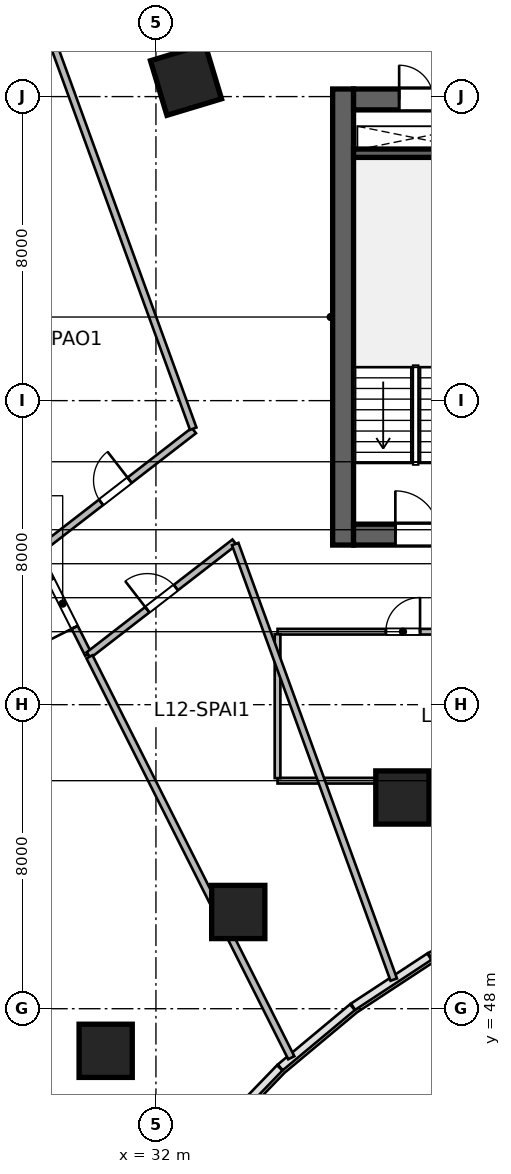
"""IFC4 building model, lengths in metres.
Left out: names, types, materials, properties, quantities, classifications, styles, units other than length and angle.
Written with IfcOpenShell. Run it as: python <this file> out.ifc"""

import sys

from ifc_helpers import new_model, si_unit, direction, frame, frame_2d, origin, origin_2d, place, context, subcontext, project, spatial, rectangle, circle, extrude, source, transform, mapped, element, fill, save


model = new_model("IFC4")
c1 = context("Model", 3, precision=1e-05, world=origin(), true_north=direction((0.0, 1.0)))
c2 = subcontext(c1, "Body", "Model", "MODEL_VIEW")
j1 = project(units=[si_unit("LENGTHUNIT", "METRE"), si_unit("PLANEANGLEUNIT", "RADIAN")], contexts=[c1])
p1 = place(None, origin())
s1 = spatial("IfcSite", under=j1, at=p1, CompositionType="ELEMENT")
p2 = place(p1, origin())
s2 = spatial("IfcBuilding", under=s1, at=p2, CompositionType="ELEMENT")
p3 = place(p2, frame((0.0, 0.0, 57.0)))
s3 = spatial("IfcBuildingStorey", under=s2, at=p3, CompositionType="ELEMENT", Elevation=57.0)
m1 = source(origin(), c2, "Body", "SweptSolid", [
    extrude(rectangle(XDim=12.0, YDim=0.55, at=frame_2d((6.0, 0.0))), origin(), (0.0, 0.0, 1.0), 3.6),
])
p4 = place(p3, frame((36.925, 60.2, 0.0), z_axis=(0.0, 0.0, 1.0), x_axis=(0.0, 1.0, 0.0)))
e1 = element("IfcWall", 1, at=p4, inside=s3, PredefinedType="SHEAR", context=c2, shape_type="MappedRepresentation", body=[
    mapped(m1, transform((0.0, 0.0, 0.0), scale=1.0)),
])
m2 = source(origin(), c2, "Body", "SweptSolid", [
    extrude(rectangle(XDim=21.6, YDim=0.55, at=frame_2d((10.8, 0.0))), origin(), (0.0, 0.0, 1.0), 3.6),
])
p5 = place(p3, frame((37.2, 60.475, 0.0), z_axis=(0.0, 0.0, 1.0), x_axis=(1.0, 0.0, 0.0)))
e2 = element("IfcWall", 2, at=p5, inside=s3, PredefinedType="SHEAR", context=c2, shape_type="MappedRepresentation", body=[
    mapped(m2, transform((0.0, 0.0, 0.0), scale=1.0)),
])
p6 = place(p5, frame((1.1, 0.0, 0.0)))
e3 = element("IfcOpeningElement", 3, at=p6, cuts=e2, PredefinedType="OPENING", context=c2, shape_type="SweptSolid", body=[
    extrude(rectangle(XDim=1.15, YDim=2.15, at=frame_2d((0.575, 1.075))), frame((0.0, 0.285, 0.0), z_axis=(0.0, -1.0, 0.0), x_axis=(1.0, 0.0, 0.0)), (0.0, 0.0, 1.0), 0.57),
])
p7 = place(p5, frame((19.5, 0.0, 0.0)))
e4 = element("IfcOpeningElement", 4, at=p7, cuts=e2, PredefinedType="OPENING", context=c2, shape_type="SweptSolid", body=[
    extrude(rectangle(XDim=0.9, YDim=2.1, at=frame_2d((0.45, 1.05))), frame((0.0, 0.285, 0.0), z_axis=(0.0, -1.0, 0.0), x_axis=(1.0, 0.0, 0.0)), (0.0, 0.0, 1.0), 0.57),
])
p8 = place(p5, frame((12.02, 0.0, 0.0)))
e5 = element("IfcOpeningElement", 5, at=p8, cuts=e2, PredefinedType="OPENING", context=c2, shape_type="SweptSolid", body=[
    extrude(rectangle(XDim=1.6, YDim=2.15, at=frame_2d((0.8, 1.075))), frame((0.0, 0.285, 0.0), z_axis=(0.0, -1.0, 0.0), x_axis=(1.0, 0.0, 0.0)), (0.0, 0.0, 1.0), 0.57),
])
p9 = place(p3, frame((37.2, 71.925, 0.0), z_axis=(0.0, 0.0, 1.0), x_axis=(1.0, 0.0, 0.0)))
e6 = element("IfcWall", 6, at=p9, inside=s3, PredefinedType="SHEAR", context=c2, shape_type="MappedRepresentation", body=[
    mapped(m2, transform((0.0, 0.0, 0.0), scale=1.0)),
])
p10 = place(p9, frame((1.2, 0.0, 0.0)))
e7 = element("IfcOpeningElement", 7, at=p10, cuts=e6, PredefinedType="OPENING", context=c2, shape_type="SweptSolid", body=[
    extrude(rectangle(XDim=0.9, YDim=2.1, at=frame_2d((0.45, 1.05))), frame((0.0, 0.285, 0.0), z_axis=(0.0, -1.0, 0.0), x_axis=(1.0, 0.0, 0.0)), (0.0, 0.0, 1.0), 0.57),
])
p11 = place(p9, frame((14.7, 0.0, 0.0)))
e8 = element("IfcOpeningElement", 8, at=p11, cuts=e6, PredefinedType="OPENING", context=c2, shape_type="SweptSolid", body=[
    extrude(rectangle(XDim=1.2, YDim=2.15, at=frame_2d((0.6, 1.075))), frame((0.0, 0.285, 0.0), z_axis=(0.0, -1.0, 0.0), x_axis=(1.0, 0.0, 0.0)), (0.0, 0.0, 1.0), 0.57),
])
p12 = place(p9, frame((4.15, 0.0, 0.0)))
e9 = element("IfcOpeningElement", 9, at=p12, cuts=e6, PredefinedType="OPENING", context=c2, shape_type="SweptSolid", body=[
    extrude(rectangle(XDim=1.3, YDim=2.15, at=frame_2d((0.65, 1.075))), frame((0.0, 0.285, 0.0), z_axis=(0.0, -1.0, 0.0), x_axis=(1.0, 0.0, 0.0)), (0.0, 0.0, 1.0), 0.57),
])
p13 = place(p9, frame((7.25, 0.0, 0.0)))
e10 = element("IfcOpeningElement", 10, at=p13, cuts=e6, PredefinedType="OPENING", context=c2, shape_type="SweptSolid", body=[
    extrude(rectangle(XDim=0.9, YDim=2.1, at=frame_2d((0.45, 1.05))), frame((0.0, 0.285, 0.0), z_axis=(0.0, -1.0, 0.0), x_axis=(1.0, 0.0, 0.0)), (0.0, 0.0, 1.0), 0.57),
])
m3 = source(origin(), c2, "Body", "SweptSolid", [
    extrude(rectangle(XDim=3.27, YDim=0.22, at=frame_2d((1.635, 0.0))), origin(), (0.0, 0.0, 1.0), 3.6),
])
p14 = place(p3, frame((37.2, 70.51, 0.0), z_axis=(0.0, 0.0, 1.0), x_axis=(1.0, 0.0, 0.0)))
e11 = element("IfcWall", 11, at=p14, inside=s3, PredefinedType="SHEAR", context=c2, shape_type="MappedRepresentation", body=[
    mapped(m3, transform((0.0, 0.0, 0.0), scale=1.0)),
])
m4 = source(origin(), c2, "Body", "SweptSolid", [
    extrude(circle(Radius=0.7, at=origin_2d()), origin(), (0.0, 0.0, 1.0), 3.6),
])
for number, where, z_axis, x_axis in (
    (12, (30.677, 46.892, 0.0), (0.0, 0.0, 1.0), (-0.571, 0.821, 0.0)),
    (13, (34.166, 50.545, 0.0), (0.0, 0.0, 1.0), (-0.436, 0.9, 0.0)),
    (14, (38.485, 53.558, 0.0), (0.0, 0.0, 1.0), (-0.289, 0.957, 0.0)),
):
    element("IfcColumn", number, at=place(p3, frame(where, z_axis=z_axis, x_axis=x_axis)), inside=s3, PredefinedType="COLUMN", context=c2, shape_type="MappedRepresentation", body=[
        mapped(m4, transform((0.0, 0.0, 0.0), scale=1.0)),
    ])
m5 = source(origin(), c2, "Body", "SweptSolid", [
    extrude(rectangle(XDim=1.5, YDim=1.5, at=origin_2d()), origin(), (0.0, 0.0, 1.0), 3.6),
])
p15 = place(p3, frame((32.791, 72.442, 0.0), z_axis=(0.0, 0.0, 1.0), x_axis=(-0.288697611798, 0.957420330337, 0.0)))
e15 = element("IfcColumn", 15, at=p15, inside=s3, PredefinedType="COLUMN", context=c2, shape_type="MappedRepresentation", body=[
    mapped(m5, transform((0.0, 0.0, 0.0), scale=1.0)),
])
m6 = source(origin(), c2, "Body", "SweptSolid", [
    extrude(rectangle(XDim=6.6, YDim=0.15, at=frame_2d((3.3, 0.0))), origin(), (0.0, 0.0, 1.0), 2.803),
])
p16 = place(p3, frame((35.2, 54.0, 0.0), z_axis=(0.0, 0.0, 1.0), x_axis=(1.0, 0.0, 0.0)))
e16 = element("IfcWall", 16, at=p16, inside=s3, PredefinedType="PARTITIONING", context=c2, shape_type="MappedRepresentation", body=[
    mapped(m6, transform((0.0, 0.0, 0.0), scale=1.0)),
])
m7 = source(origin(), c2, "Body", "SweptSolid", [
    extrude(rectangle(XDim=6.6, YDim=0.15, at=frame_2d((3.3, 0.0))), origin(), (0.0, 0.0, 1.0), 3.36),
])
p17 = place(p3, frame((35.2, 57.92, 0.0), z_axis=(0.0, 0.0, 1.0), x_axis=(1.0, 0.0, 0.0)))
e17 = element("IfcWall", 17, at=p17, inside=s3, PredefinedType="PARTITIONING", context=c2, shape_type="MappedRepresentation", body=[
    mapped(m7, transform((0.0, 0.0, 0.0), scale=1.0)),
])
p18 = place(p17, frame((2.85, 0.0, 0.0)))
e18 = element("IfcOpeningElement", 18, at=p18, cuts=e17, PredefinedType="OPENING", context=c2, shape_type="SweptSolid", body=[
    extrude(rectangle(XDim=0.9, YDim=2.1, at=frame_2d((0.45, 1.05))), frame((0.0, 0.085, 0.0), z_axis=(0.0, -1.0, 0.0), x_axis=(1.0, 0.0, 0.0)), (0.0, 0.0, 1.0), 0.17),
])
m8 = source(origin(), c2, "Body", "SweptSolid", [
    extrude(rectangle(XDim=3.785, YDim=0.15, at=frame_2d((1.893, 0.0))), origin(), (0.0, 0.0, 1.0), 3.36),
])
p19 = place(p3, frame((35.2, 54.067, 0.0), z_axis=(0.0, 0.0, 1.0), x_axis=(0.0, 1.0, 0.0)))
e19 = element("IfcWall", 19, at=p19, inside=s3, PredefinedType="PARTITIONING", context=c2, shape_type="MappedRepresentation", body=[
    mapped(m8, transform((0.0, 0.0, 0.0), scale=1.0)),
])
m9 = source(origin(), c2, "Body", "SweptSolid", [
    extrude(rectangle(XDim=2.985, YDim=0.18, at=frame_2d((1.493, 0.0))), origin(), (0.0, 0.0, 1.0), 3.36),
])
p20 = place(p3, frame((30.218, 57.327, 0.0), z_axis=(0.0, 0.0, 1.0), x_axis=(-0.449665526069, 0.893197018952, 0.0)))
e20 = element("IfcWall", 20, at=p20, inside=s3, PredefinedType="PLUMBINGWALL", context=c2, shape_type="MappedRepresentation", body=[
    mapped(m9, transform((0.0, 0.0, 0.0), scale=1.0)),
])
p21 = place(p20, frame((0.792, 0.0, 0.0)))
e21 = element("IfcOpeningElement", 21, at=p21, cuts=e20, PredefinedType="OPENING", context=c2, shape_type="SweptSolid", body=[
    extrude(rectangle(XDim=1.4, YDim=2.15, at=frame_2d((0.7, 1.075))), frame((0.0, 0.1, 0.0), z_axis=(0.0, -1.0, 0.0), x_axis=(1.0, 0.0, 0.0)), (0.0, 0.0, 1.0), 0.2),
])
m10 = source(origin(), c2, "Body", "SweptSolid", [
    extrude(rectangle(XDim=5.227, YDim=0.18, at=frame_2d((2.614, 0.0))), origin(), (0.0, 0.0, 1.0), 3.36),
])
p22 = place(p3, frame((28.865, 60.015, 0.0), z_axis=(0.0, 0.0, 1.0), x_axis=(0.790908912792, 0.61193389485, 0.0)))
e22 = element("IfcWall", 22, at=p22, inside=s3, PredefinedType="PLUMBINGWALL", context=c2, shape_type="MappedRepresentation", body=[
    mapped(m10, transform((0.0, 0.0, 0.0), scale=1.0)),
])
p23 = place(p22, frame((2.139, 0.0, 0.0)))
e23 = element("IfcOpeningElement", 23, at=p23, cuts=e22, PredefinedType="OPENING", context=c2, shape_type="SweptSolid", body=[
    extrude(rectangle(XDim=0.95, YDim=2.1, at=frame_2d((0.475, 1.05))), frame((0.0, 0.1, 0.0), z_axis=(0.0, -1.0, 0.0), x_axis=(1.0, 0.0, 0.0)), (0.0, 0.0, 1.0), 0.2),
])
m11 = source(origin(), c2, "Body", "SweptSolid", [
    extrude(rectangle(XDim=12.088, YDim=0.18, at=frame_2d((6.044, 0.0))), origin(), (0.0, 0.0, 1.0), 3.36),
])
p24 = place(p3, frame((32.981, 63.262, 0.0), z_axis=(0.0, 0.0, 1.0), x_axis=(-0.34203007529, 0.939689005787, 0.0)))
e24 = element("IfcWall", 24, at=p24, inside=s3, PredefinedType="PLUMBINGWALL", context=c2, shape_type="MappedRepresentation", body=[
    mapped(m11, transform((0.0, 0.0, 0.0), scale=1.0)),
])
m12 = source(origin(), c2, "Body", "SweptSolid", [
    extrude(rectangle(XDim=4.855, YDim=0.18, at=frame_2d((2.427, 0.0))), origin(), (0.0, 0.0, 1.0), 3.36),
])
p25 = place(p3, frame((30.229, 57.305, 0.0), z_axis=(0.0, 0.0, 1.0), x_axis=(0.790930965655, 0.611905391028, 0.0)))
e25 = element("IfcWall", 25, at=p25, inside=s3, PredefinedType="PLUMBINGWALL", context=c2, shape_type="MappedRepresentation", body=[
    mapped(m12, transform((0.0, 0.0, 0.0), scale=1.0)),
])
p26 = place(p25, frame((1.952, 0.0, 0.0)))
e26 = element("IfcOpeningElement", 26, at=p26, cuts=e25, PredefinedType="OPENING", context=c2, shape_type="SweptSolid", body=[
    extrude(rectangle(XDim=0.95, YDim=2.1, at=frame_2d((0.475, 1.05))), frame((0.0, 0.1, 0.0), z_axis=(0.0, -1.0, 0.0), x_axis=(1.0, 0.0, 0.0)), (0.0, 0.0, 1.0), 0.2),
])
m13 = source(origin(), c2, "Body", "SweptSolid", [
    extrude(rectangle(XDim=11.811, YDim=0.18, at=frame_2d((5.906, 0.0))), origin(), (0.0, 0.0, 1.0), 3.36),
])
p27 = place(p3, frame((35.562, 46.71, 0.0), z_axis=(0.0, 0.0, 1.0), x_axis=(-0.449626289102, 0.893216771086, 0.0)))
e27 = element("IfcWall", 27, at=p27, inside=s3, PredefinedType="PLUMBINGWALL", context=c2, shape_type="MappedRepresentation", body=[
    mapped(m13, transform((0.0, 0.0, 0.0), scale=1.0)),
])
m14 = source(origin(), c2, "Body", "SweptSolid", [
    extrude(rectangle(XDim=12.196, YDim=0.18, at=frame_2d((6.098, 0.0))), origin(), (0.0, 0.0, 1.0), 3.36),
])
p28 = place(p3, frame((38.258, 48.766, 0.0), z_axis=(0.0, 0.0, 1.0), x_axis=(-0.342022711534, 0.939691686031, 0.0)))
e28 = element("IfcWall", 28, at=p28, inside=s3, PredefinedType="PLUMBINGWALL", context=c2, shape_type="MappedRepresentation", body=[
    mapped(m14, transform((0.0, 0.0, 0.0), scale=1.0)),
])
m15 = source(origin(), c2, "Body", "SweptSolid", [
    extrude(rectangle(XDim=1.15, YDim=2.15, at=frame_2d((0.575, 1.075))), frame((0.0, 0.025, 0.0), z_axis=(0.0, -1.0, 0.0), x_axis=(1.0, 0.0, 0.0)), (0.0, 0.0, 1.0), 0.05),
])
p29 = place(p6, origin())
e29 = element("IfcDoor", 29, at=p29, inside=s3, OperationType="SINGLE_SWING_LEFT", PredefinedType="DOOR", context=c2, shape_type="MappedRepresentation", body=[
    mapped(m15, transform((0.0, 0.0, 0.0), scale=1.0)),
])
fill(e3, e29)
m16 = source(origin(), c2, "Body", "SweptSolid", [
    extrude(rectangle(XDim=0.9, YDim=2.1, at=frame_2d((0.45, 1.05))), frame((0.0, 0.025, 0.0), z_axis=(0.0, -1.0, 0.0), x_axis=(1.0, 0.0, 0.0)), (0.0, 0.0, 1.0), 0.05),
])
p30 = place(p10, origin())
e30 = element("IfcDoor", 30, at=p30, inside=s3, OperationType="SINGLE_SWING_LEFT", PredefinedType="DOOR", context=c2, shape_type="MappedRepresentation", body=[
    mapped(m16, transform((0.0, 0.0, 0.0), scale=1.0)),
])
fill(e7, e30)
p31 = place(p18, origin())
e31 = element("IfcDoor", 31, at=p31, inside=s3, OperationType="SINGLE_SWING_RIGHT", PredefinedType="DOOR", context=c2, shape_type="MappedRepresentation", body=[
    mapped(m16, transform((0.0, 0.0, 0.0), scale=1.0)),
])
fill(e18, e31)
m17 = source(origin(), c2, "Body", "SweptSolid", [
    extrude(rectangle(XDim=1.4, YDim=2.15, at=frame_2d((0.7, 1.075))), frame((0.0, 0.025, 0.0), z_axis=(0.0, -1.0, 0.0), x_axis=(1.0, 0.0, 0.0)), (0.0, 0.0, 1.0), 0.05),
])
p32 = place(p21, origin())
e32 = element("IfcDoor", 32, at=p32, inside=s3, OperationType="SINGLE_SWING_LEFT", PredefinedType="DOOR", context=c2, shape_type="MappedRepresentation", body=[
    mapped(m17, transform((0.0, 0.0, 0.0), scale=1.0)),
])
fill(e21, e32)
m18 = source(origin(), c2, "Body", "SweptSolid", [
    extrude(rectangle(XDim=0.95, YDim=2.1, at=frame_2d((0.475, 1.05))), frame((0.0, 0.025, 0.0), z_axis=(0.0, -1.0, 0.0), x_axis=(1.0, 0.0, 0.0)), (0.0, 0.0, 1.0), 0.05),
])
p33 = place(p23, origin())
e33 = element("IfcDoor", 33, at=p33, inside=s3, OperationType="SINGLE_SWING_RIGHT", PredefinedType="DOOR", context=c2, shape_type="MappedRepresentation", body=[
    mapped(m18, transform((0.0, 0.0, 0.0), scale=1.0)),
])
fill(e23, e33)
p34 = place(p26, origin())
e34 = element("IfcDoor", 34, at=p34, inside=s3, OperationType="SINGLE_SWING_LEFT", PredefinedType="DOOR", context=c2, shape_type="MappedRepresentation", body=[
    mapped(m18, transform((0.0, 0.0, 0.0), scale=1.0)),
])
fill(e26, e34)
save(model, sys.argv[1])
